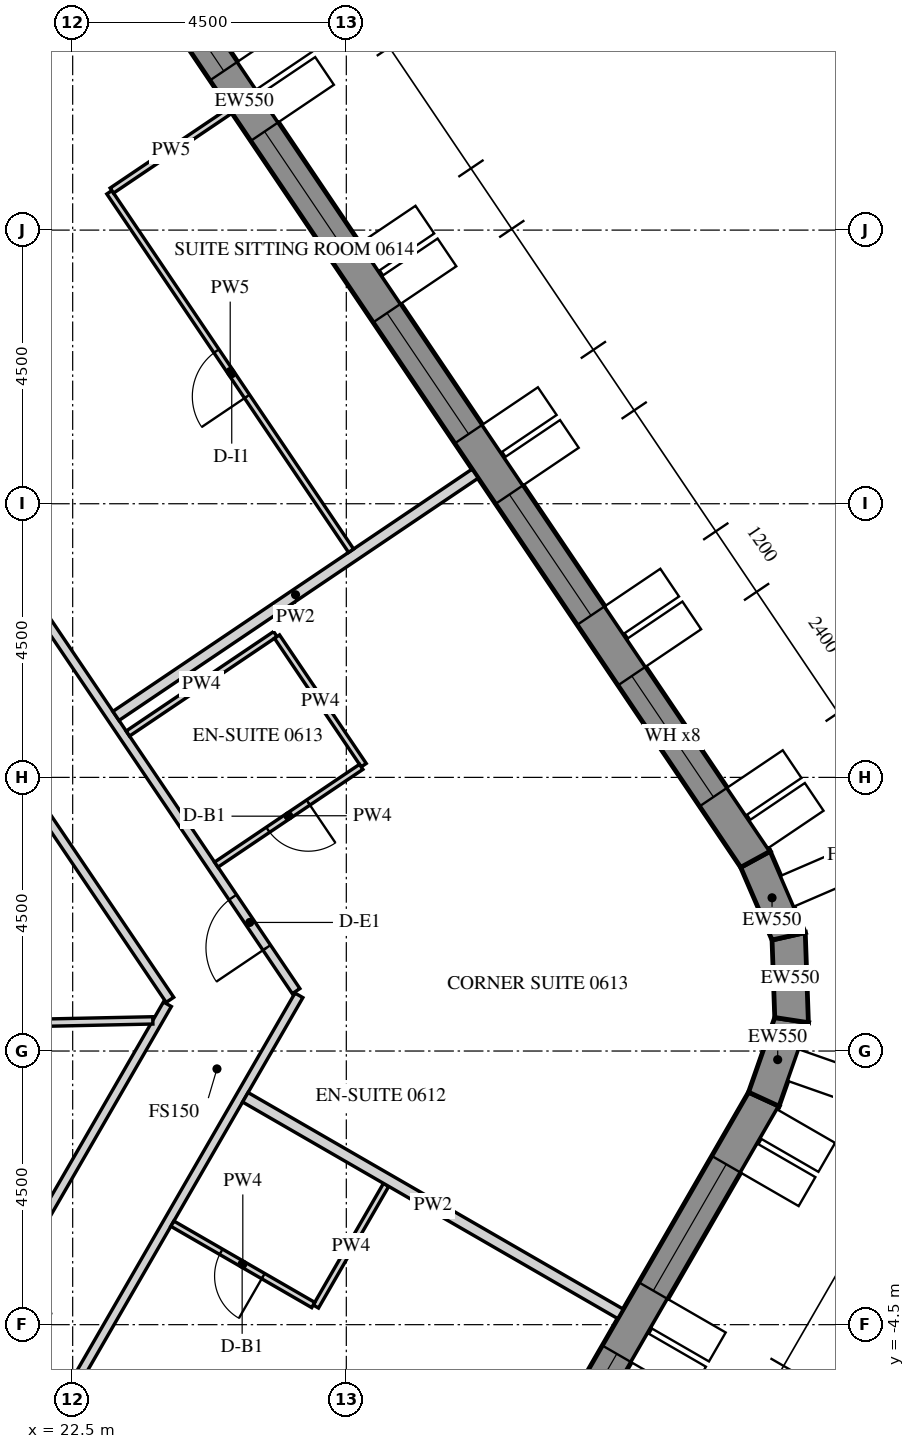
"""IFC4 building model, lengths in metres.
Left out: names, types, materials, properties, quantities, classifications, styles, units other than length and angle.
Written with IfcOpenShell. Run it as: python <this file> out.ifc"""

import sys

from ifc_helpers import new_model, si_unit, direction, frame, frame_2d, origin, place, context, subcontext, project, spatial, polyline, rectangle, outline, extrude, element, fill, save


model = new_model("IFC4")
c1 = context("Model", 3, precision=1e-05, world=origin(), true_north=direction((0.0, 1.0)))
c2 = subcontext(c1, "Body", "Model", "MODEL_VIEW")
j1 = project(units=[si_unit("LENGTHUNIT", "METRE"), si_unit("PLANEANGLEUNIT", "RADIAN")], contexts=[c1])
p1 = place(None, origin())
s1 = spatial("IfcSite", under=j1, at=p1, CompositionType="ELEMENT")
p2 = place(p1, origin())
s2 = spatial("IfcBuilding", under=s1, at=p2, CompositionType="ELEMENT")
p3 = place(p2, frame((0.0, 0.0, 92.1)))
s3 = spatial("IfcBuildingStorey", under=s2, at=p3, CompositionType="ELEMENT", Elevation=92.1)
p4 = place(p3, frame((18.83, -26.835, -0.15), z_axis=(0.0, 0.0, 1.0), x_axis=(0.500003800416, 0.866023209602, 0.0)))
e1 = element("IfcWall", 1, at=p4, inside=s3, PredefinedType="SOLIDWALL", context=c2, shape_type="SweptSolid", body=[
    extrude(outline(polyline([(-0.022, -0.275), (30.097, -0.275), (30.045, 0.275), (0.022, 0.275), (-0.022, -0.275)])), origin(), (0.0, 0.0, 1.0), 3.9),
])
p5 = place(p4, frame((1.236, 0.0, 1.05)))
e2 = element("IfcOpeningElement", 2, at=p5, cuts=e1, PredefinedType="OPENING", context=c2, shape_type="SweptSolid", body=[
    extrude(rectangle(XDim=2.4, YDim=2.4, at=frame_2d((1.2, 1.2))), frame((0.0, 0.285, 0.0), z_axis=(0.0, -1.0, 0.0), x_axis=(1.0, 0.0, 0.0)), (0.0, 0.0, 1.0), 0.57),
])
p6 = place(p4, frame((4.835, 0.0, 1.05)))
e3 = element("IfcOpeningElement", 3, at=p6, cuts=e1, PredefinedType="OPENING", context=c2, shape_type="SweptSolid", body=[
    extrude(rectangle(XDim=2.4, YDim=2.4, at=frame_2d((1.2, 1.2))), frame((0.0, 0.285, 0.0), z_axis=(0.0, -1.0, 0.0), x_axis=(1.0, 0.0, 0.0)), (0.0, 0.0, 1.0), 0.57),
])
p7 = place(p4, frame((8.436, 0.0, 1.05)))
e4 = element("IfcOpeningElement", 4, at=p7, cuts=e1, PredefinedType="OPENING", context=c2, shape_type="SweptSolid", body=[
    extrude(rectangle(XDim=2.4, YDim=2.4, at=frame_2d((1.2, 1.2))), frame((0.0, 0.285, 0.0), z_axis=(0.0, -1.0, 0.0), x_axis=(1.0, 0.0, 0.0)), (0.0, 0.0, 1.0), 0.57),
])
p8 = place(p4, frame((12.035, 0.0, 1.05)))
e5 = element("IfcOpeningElement", 5, at=p8, cuts=e1, PredefinedType="OPENING", context=c2, shape_type="SweptSolid", body=[
    extrude(rectangle(XDim=2.4, YDim=2.4, at=frame_2d((1.2, 1.2))), frame((0.0, 0.285, 0.0), z_axis=(0.0, -1.0, 0.0), x_axis=(1.0, 0.0, 0.0)), (0.0, 0.0, 1.0), 0.57),
])
p9 = place(p4, frame((15.635, 0.0, 1.05)))
e6 = element("IfcOpeningElement", 6, at=p9, cuts=e1, PredefinedType="OPENING", context=c2, shape_type="SweptSolid", body=[
    extrude(rectangle(XDim=2.4, YDim=2.4, at=frame_2d((1.2, 1.2))), frame((0.0, 0.285, 0.0), z_axis=(0.0, -1.0, 0.0), x_axis=(1.0, 0.0, 0.0)), (0.0, 0.0, 1.0), 0.57),
])
p10 = place(p4, frame((19.236, 0.0, 1.05)))
e7 = element("IfcOpeningElement", 7, at=p10, cuts=e1, PredefinedType="OPENING", context=c2, shape_type="SweptSolid", body=[
    extrude(rectangle(XDim=2.4, YDim=2.4, at=frame_2d((1.2, 1.2))), frame((0.0, 0.285, 0.0), z_axis=(0.0, -1.0, 0.0), x_axis=(1.0, 0.0, 0.0)), (0.0, 0.0, 1.0), 0.57),
])
p11 = place(p4, frame((22.835, 0.0, 1.05)))
e8 = element("IfcOpeningElement", 8, at=p11, cuts=e1, PredefinedType="OPENING", context=c2, shape_type="SweptSolid", body=[
    extrude(rectangle(XDim=2.4, YDim=2.4, at=frame_2d((1.2, 1.2))), frame((0.0, 0.285, 0.0), z_axis=(0.0, -1.0, 0.0), x_axis=(1.0, 0.0, 0.0)), (0.0, 0.0, 1.0), 0.57),
])
p12 = place(p4, frame((26.436, 0.0, 1.05)))
e9 = element("IfcOpeningElement", 9, at=p12, cuts=e1, PredefinedType="OPENING", context=c2, shape_type="SweptSolid", body=[
    extrude(rectangle(XDim=2.4, YDim=2.4, at=frame_2d((1.2, 1.2))), frame((0.0, 0.285, 0.0), z_axis=(0.0, -1.0, 0.0), x_axis=(1.0, 0.0, 0.0)), (0.0, 0.0, 1.0), 0.57),
])
p13 = place(p3, frame((33.866, -0.792, -0.15), z_axis=(0.0, 0.0, 1.0), x_axis=(0.33111537203, 0.943590276765, 0.0)))
e10 = element("IfcWall", 10, at=p13, inside=s3, PredefinedType="SOLIDWALL", context=c2, shape_type="SweptSolid", body=[
    extrude(outline(polyline([(-0.026, -0.275), (1.431, -0.275), (1.327, 0.275), (0.026, 0.275), (-0.026, -0.275)])), origin(), (0.0, 0.0, 1.0), 3.9),
])
p14 = place(p3, frame((34.323, 0.509, -0.15), z_axis=(0.0, 0.0, 1.0), x_axis=(-0.034876908462, 0.999391615562, 0.0)))
e11 = element("IfcWall", 11, at=p14, inside=s3, PredefinedType="SOLIDWALL", context=c2, shape_type="SweptSolid", body=[
    extrude(outline(polyline([(-0.052, -0.275), (1.431, -0.275), (1.327, 0.275), (0.052, 0.275), (-0.052, -0.275)])), origin(), (0.0, 0.0, 1.0), 3.9),
])
p15 = place(p3, frame((34.274, 1.887, -0.15), z_axis=(0.0, 0.0, 1.0), x_axis=(-0.396161342798, 0.918180913803, 0.0)))
e12 = element("IfcWall", 12, at=p15, inside=s3, PredefinedType="SOLIDWALL", context=c2, shape_type="SweptSolid", body=[
    extrude(outline(polyline([(-0.052, -0.275), (1.405, -0.275), (1.354, 0.275), (0.052, 0.275), (-0.052, -0.275)])), origin(), (0.0, 0.0, 1.0), 3.9),
])
p16 = place(p3, frame((33.728, 3.153, -0.15), z_axis=(0.0, 0.0, 1.0), x_axis=(-0.559192411416, 0.82903790445, 0.0)))
e13 = element("IfcWall", 13, at=p16, inside=s3, PredefinedType="SOLIDWALL", context=c2, shape_type="SweptSolid", body=[
    extrude(outline(polyline([(-0.026, -0.275), (30.093, -0.275), (30.048, 0.275), (0.026, 0.275), (-0.026, -0.275)])), origin(), (0.0, 0.0, 1.0), 3.9),
])
p17 = place(p16, frame((1.236, 0.0, 1.05)))
e14 = element("IfcOpeningElement", 14, at=p17, cuts=e13, PredefinedType="OPENING", context=c2, shape_type="SweptSolid", body=[
    extrude(rectangle(XDim=2.4, YDim=2.4, at=frame_2d((1.2, 1.2))), frame((0.0, 0.285, 0.0), z_axis=(0.0, -1.0, 0.0), x_axis=(1.0, 0.0, 0.0)), (0.0, 0.0, 1.0), 0.57),
])
p18 = place(p16, frame((4.835, 0.0, 1.05)))
e15 = element("IfcOpeningElement", 15, at=p18, cuts=e13, PredefinedType="OPENING", context=c2, shape_type="SweptSolid", body=[
    extrude(rectangle(XDim=2.4, YDim=2.4, at=frame_2d((1.2, 1.2))), frame((0.0, 0.285, 0.0), z_axis=(0.0, -1.0, 0.0), x_axis=(1.0, 0.0, 0.0)), (0.0, 0.0, 1.0), 0.57),
])
p19 = place(p16, frame((8.436, 0.0, 1.05)))
e16 = element("IfcOpeningElement", 16, at=p19, cuts=e13, PredefinedType="OPENING", context=c2, shape_type="SweptSolid", body=[
    extrude(rectangle(XDim=2.4, YDim=2.4, at=frame_2d((1.2, 1.2))), frame((0.0, 0.285, 0.0), z_axis=(0.0, -1.0, 0.0), x_axis=(1.0, 0.0, 0.0)), (0.0, 0.0, 1.0), 0.57),
])
p20 = place(p16, frame((12.035, 0.0, 1.05)))
e17 = element("IfcOpeningElement", 17, at=p20, cuts=e13, PredefinedType="OPENING", context=c2, shape_type="SweptSolid", body=[
    extrude(rectangle(XDim=2.4, YDim=2.4, at=frame_2d((1.2, 1.2))), frame((0.0, 0.285, 0.0), z_axis=(0.0, -1.0, 0.0), x_axis=(1.0, 0.0, 0.0)), (0.0, 0.0, 1.0), 0.57),
])
p21 = place(p16, frame((15.635, 0.0, 1.05)))
e18 = element("IfcOpeningElement", 18, at=p21, cuts=e13, PredefinedType="OPENING", context=c2, shape_type="SweptSolid", body=[
    extrude(rectangle(XDim=2.4, YDim=2.4, at=frame_2d((1.2, 1.2))), frame((0.0, 0.285, 0.0), z_axis=(0.0, -1.0, 0.0), x_axis=(1.0, 0.0, 0.0)), (0.0, 0.0, 1.0), 0.57),
])
p22 = place(p16, frame((19.236, 0.0, 1.05)))
e19 = element("IfcOpeningElement", 19, at=p22, cuts=e13, PredefinedType="OPENING", context=c2, shape_type="SweptSolid", body=[
    extrude(rectangle(XDim=2.4, YDim=2.4, at=frame_2d((1.2, 1.2))), frame((0.0, 0.285, 0.0), z_axis=(0.0, -1.0, 0.0), x_axis=(1.0, 0.0, 0.0)), (0.0, 0.0, 1.0), 0.57),
])
p23 = place(p16, frame((22.835, 0.0, 1.05)))
e20 = element("IfcOpeningElement", 20, at=p23, cuts=e13, PredefinedType="OPENING", context=c2, shape_type="SweptSolid", body=[
    extrude(rectangle(XDim=2.4, YDim=2.4, at=frame_2d((1.2, 1.2))), frame((0.0, 0.285, 0.0), z_axis=(0.0, -1.0, 0.0), x_axis=(1.0, 0.0, 0.0)), (0.0, 0.0, 1.0), 0.57),
])
p24 = place(p16, frame((26.436, 0.0, 1.05)))
e21 = element("IfcOpeningElement", 21, at=p24, cuts=e13, PredefinedType="OPENING", context=c2, shape_type="SweptSolid", body=[
    extrude(rectangle(XDim=2.4, YDim=2.4, at=frame_2d((1.2, 1.2))), frame((0.0, 0.285, 0.0), z_axis=(0.0, -1.0, 0.0), x_axis=(1.0, 0.0, 0.0)), (0.0, 0.0, 1.0), 0.57),
])
p25 = place(p3, frame((14.102, -20.075, 0.0), z_axis=(0.0, 0.0, 1.0), x_axis=(0.499996816197, 0.866027241946, 0.0)))
e22 = element("IfcWall", 22, at=p25, inside=s3, PredefinedType="PARTITIONING", context=c2, shape_type="SweptSolid", body=[
    extrude(rectangle(XDim=24.238, YDim=0.15, at=frame_2d((12.119, 0.0))), origin(), (0.0, 0.0, 1.0), 2.988),
])
p26 = place(p25, frame((4.729, 0.0, 0.0)))
e23 = element("IfcOpeningElement", 23, at=p26, cuts=e22, PredefinedType="OPENING", context=c2, shape_type="SweptSolid", body=[
    extrude(rectangle(XDim=1.0, YDim=2.1, at=frame_2d((0.5, 1.05))), frame((0.0, 0.085, 0.0), z_axis=(0.0, -1.0, 0.0), x_axis=(1.0, 0.0, 0.0)), (0.0, 0.0, 1.0), 0.17),
])
p27 = place(p25, frame((13.446, 0.0, 0.0)))
e24 = element("IfcOpeningElement", 24, at=p27, cuts=e22, PredefinedType="OPENING", context=c2, shape_type="SweptSolid", body=[
    extrude(rectangle(XDim=1.0, YDim=2.1, at=frame_2d((0.5, 1.05))), frame((0.0, 0.085, 0.0), z_axis=(0.0, -1.0, 0.0), x_axis=(1.0, 0.0, 0.0)), (0.0, 0.0, 1.0), 0.17),
])
p28 = place(p3, frame((26.174, 0.985, 0.0), z_axis=(0.0, 0.0, 1.0), x_axis=(-0.559199676409, 0.82903300411, 0.0)))
e25 = element("IfcWall", 25, at=p28, inside=s3, PredefinedType="PARTITIONING", context=c2, shape_type="SweptSolid", body=[
    extrude(rectangle(XDim=22.335, YDim=0.15, at=frame_2d((11.168, 0.0))), origin(), (0.0, 0.0, 1.0), 2.988),
])
p29 = place(p28, frame((0.863, 0.0, 0.0)))
e26 = element("IfcOpeningElement", 26, at=p29, cuts=e25, PredefinedType="OPENING", context=c2, shape_type="SweptSolid", body=[
    extrude(rectangle(XDim=1.0, YDim=2.1, at=frame_2d((0.5, 1.05))), frame((0.0, 0.085, 0.0), z_axis=(0.0, -1.0, 0.0), x_axis=(1.0, 0.0, 0.0)), (0.0, 0.0, 1.0), 0.17),
])
p30 = place(p28, frame((10.909, 0.0, 0.0)))
e27 = element("IfcOpeningElement", 27, at=p30, cuts=e25, PredefinedType="OPENING", context=c2, shape_type="SweptSolid", body=[
    extrude(rectangle(XDim=1.0, YDim=2.1, at=frame_2d((0.5, 1.05))), frame((0.0, 0.085, 0.0), z_axis=(0.0, -1.0, 0.0), x_axis=(1.0, 0.0, 0.0)), (0.0, 0.0, 1.0), 0.17),
])
p31 = place(p3, frame((24.058, 0.769, 0.0), z_axis=(0.0, 0.0, 1.0), x_axis=(-0.499995346943, -0.866028090212, 0.0)))
e28 = element("IfcWall", 28, at=p31, inside=s3, PredefinedType="PARTITIONING", context=c2, shape_type="SweptSolid", body=[
    extrude(rectangle(XDim=11.616, YDim=0.15, at=frame_2d((5.808, 0.0))), origin(), (0.0, 0.0, 1.0), 2.988),
])
p32 = place(p31, frame((5.358, 0.0, 0.0)))
e29 = element("IfcOpeningElement", 29, at=p32, cuts=e28, PredefinedType="OPENING", context=c2, shape_type="SweptSolid", body=[
    extrude(rectangle(XDim=0.9, YDim=2.1, at=frame_2d((0.45, 1.05))), frame((0.0, 0.085, 0.0), z_axis=(0.0, -1.0, 0.0), x_axis=(1.0, 0.0, 0.0)), (0.0, 0.0, 1.0), 0.17),
])
p33 = place(p3, frame((18.4, 9.291, 0.0), z_axis=(0.0, 0.0, 1.0), x_axis=(0.559191829043, -0.829038297265, 0.0)))
e30 = element("IfcWall", 30, at=p33, inside=s3, PredefinedType="PARTITIONING", context=c2, shape_type="SweptSolid", body=[
    extrude(rectangle(XDim=10.192, YDim=0.15, at=frame_2d((5.096, 0.0))), origin(), (0.0, 0.0, 1.0), 2.988),
])
p34 = place(p33, frame((4.646, 0.0, 0.0)))
e31 = element("IfcOpeningElement", 31, at=p34, cuts=e30, PredefinedType="OPENING", context=c2, shape_type="SweptSolid", body=[
    extrude(rectangle(XDim=0.9, YDim=2.1, at=frame_2d((0.45, 1.05))), frame((0.0, 0.085, 0.0), z_axis=(0.0, -1.0, 0.0), x_axis=(1.0, 0.0, 0.0)), (0.0, 0.0, 1.0), 0.17),
])
p35 = place(p3, frame((27.655, -2.201, 0.0), z_axis=(0.0, 0.0, 1.0), x_axis=(-0.500015210774, -0.866016621662, 0.0)))
e32 = element("IfcWall", 32, at=p35, inside=s3, PredefinedType="PARTITIONING", context=c2, shape_type="SweptSolid", body=[
    extrude(rectangle(XDim=2.31, YDim=0.1, at=frame_2d((1.155, 0.0))), origin(), (0.0, 0.0, 1.0), 2.988),
])
p36 = place(p3, frame((26.456, -4.177, 0.0), z_axis=(0.0, 0.0, 1.0), x_axis=(-0.866021425885, 0.500006889861, 0.0)))
e33 = element("IfcWall", 33, at=p36, inside=s3, PredefinedType="PARTITIONING", context=c2, shape_type="SweptSolid", body=[
    extrude(rectangle(XDim=2.675, YDim=0.1, at=frame_2d((1.337, 0.0))), origin(), (0.0, 0.0, 1.0), 2.988),
])
p37 = place(p36, frame((0.95, 0.0, 0.0)))
e34 = element("IfcOpeningElement", 34, at=p37, cuts=e33, PredefinedType="OPENING", context=c2, shape_type="SweptSolid", body=[
    extrude(rectangle(XDim=0.8, YDim=2.1, at=frame_2d((0.4, 1.05))), frame((0.0, 0.06, 0.0), z_axis=(0.0, -1.0, 0.0), x_axis=(1.0, 0.0, 0.0)), (0.0, 0.0, 1.0), 0.12),
])
p38 = place(p3, frame((31.51, -4.323, 0.0), z_axis=(0.0, 0.0, 1.0), x_axis=(-0.866039509621, 0.499975567179, 0.0)))
e35 = element("IfcWall", 35, at=p38, inside=s3, PredefinedType="PARTITIONING", context=c2, shape_type="SweptSolid", body=[
    extrude(rectangle(XDim=7.125, YDim=0.18, at=frame_2d((3.562, 0.0))), origin(), (0.0, 0.0, 1.0), 2.988),
])
p39 = place(p3, frame((23.407, 5.221, 0.0), z_axis=(0.0, 0.0, 1.0), x_axis=(0.829007334469, 0.559237730663, 0.0)))
e36 = element("IfcWall", 36, at=p39, inside=s3, PredefinedType="PARTITIONING", context=c2, shape_type="SweptSolid", body=[
    extrude(rectangle(XDim=2.925, YDim=0.1, at=frame_2d((1.462, 0.0))), origin(), (0.0, 0.0, 1.0), 2.988),
])
p40 = place(p3, frame((25.86, 6.815, 0.0), z_axis=(0.0, 0.0, 1.0), x_axis=(0.559155442782, -0.829062838878, 0.0)))
e37 = element("IfcWall", 37, at=p40, inside=s3, PredefinedType="PARTITIONING", context=c2, shape_type="SweptSolid", body=[
    extrude(rectangle(XDim=2.55, YDim=0.1, at=frame_2d((1.275, 0.0))), origin(), (0.0, 0.0, 1.0), 2.988),
])
p41 = place(p3, frame((27.245, 4.673, 0.0), z_axis=(0.0, 0.0, 1.0), x_axis=(-0.82904649496, -0.559179675234, 0.0)))
e38 = element("IfcWall", 38, at=p41, inside=s3, PredefinedType="PARTITIONING", context=c2, shape_type="SweptSolid", body=[
    extrude(rectangle(XDim=2.875, YDim=0.1, at=frame_2d((1.438, 0.0))), origin(), (0.0, 0.0, 1.0), 2.988),
])
p42 = place(p41, frame((1.05, 0.0, 0.0)))
e39 = element("IfcOpeningElement", 39, at=p42, cuts=e38, PredefinedType="OPENING", context=c2, shape_type="SweptSolid", body=[
    extrude(rectangle(XDim=0.8, YDim=2.1, at=frame_2d((0.4, 1.05))), frame((0.0, 0.06, 0.0), z_axis=(0.0, -1.0, 0.0), x_axis=(1.0, 0.0, 0.0)), (0.0, 0.0, 1.0), 0.12),
])
p43 = place(p3, frame((29.119, 9.495, 0.0), z_axis=(0.0, 0.0, 1.0), x_axis=(-0.82903334026, -0.559199178055, 0.0)))
e40 = element("IfcWall", 40, at=p43, inside=s3, PredefinedType="PARTITIONING", context=c2, shape_type="SweptSolid", body=[
    extrude(rectangle(XDim=7.125, YDim=0.18, at=frame_2d((3.562, 0.0))), origin(), (0.0, 0.0, 1.0), 2.988),
])
p44 = place(p3, frame((27.079, 8.228, 0.0), z_axis=(0.0, 0.0, 1.0), x_axis=(-0.559200948469, 0.829032146078, 0.0)))
e41 = element("IfcWall", 41, at=p44, inside=s3, PredefinedType="PARTITIONING", context=c2, shape_type="SweptSolid", body=[
    extrude(rectangle(XDim=7.11, YDim=0.1, at=frame_2d((3.555, 0.0))), origin(), (0.0, 0.0, 1.0), 2.988),
])
p45 = place(p44, frame((3.06, 0.0, 0.0)))
e42 = element("IfcOpeningElement", 42, at=p45, cuts=e41, PredefinedType="OPENING", context=c2, shape_type="SweptSolid", body=[
    extrude(rectangle(XDim=0.9, YDim=2.1, at=frame_2d((0.45, 1.05))), frame((0.0, 0.06, 0.0), z_axis=(0.0, -1.0, 0.0), x_axis=(1.0, 0.0, 0.0)), (0.0, 0.0, 1.0), 0.12),
])
p46 = place(p3, frame((23.144, 14.15, 0.0), z_axis=(0.0, 0.0, 1.0), x_axis=(0.829065408555, 0.559151632687, 0.0)))
e43 = element("IfcWall", 43, at=p46, inside=s3, PredefinedType="PARTITIONING", context=c2, shape_type="SweptSolid", body=[
    extrude(rectangle(XDim=2.35, YDim=0.1, at=frame_2d((1.175, 0.0))), origin(), (0.0, 0.0, 1.0), 2.988),
])
p47 = place(p3, frame((23.818, 0.504, 0.0), z_axis=(0.0, 0.0, 1.0), x_axis=(-0.999776284395, -0.021151386765, 0.0)))
e44 = element("IfcWall", 44, at=p47, inside=s3, PredefinedType="PARTITIONING", context=c2, shape_type="SweptSolid", body=[
    extrude(rectangle(XDim=7.849, YDim=0.12, at=frame_2d((3.924, 0.0))), origin(), (0.0, 0.0, 1.0), 2.988),
])
p48 = place(p11, frame((0.0, 0.205, 0.0)))
e45 = element("IfcWindow", 45, at=p48, inside=s3, PartitioningType="DOUBLE_PANEL_VERTICAL", PredefinedType="WINDOW", context=c2, shape_type="SweptSolid", body=[
    extrude(rectangle(XDim=2.4, YDim=2.4, at=frame_2d((1.2, 1.2))), frame((0.0, 0.03, 0.0), z_axis=(0.0, -1.0, 0.0), x_axis=(1.0, 0.0, 0.0)), (0.0, 0.0, 1.0), 0.06),
])
fill(e8, e45)
p49 = place(p12, frame((0.0, 0.205, 0.0)))
e46 = element("IfcWindow", 46, at=p49, inside=s3, PartitioningType="DOUBLE_PANEL_VERTICAL", PredefinedType="WINDOW", context=c2, shape_type="SweptSolid", body=[
    extrude(rectangle(XDim=2.4, YDim=2.4, at=frame_2d((1.2, 1.2))), frame((0.0, 0.03, 0.0), z_axis=(0.0, -1.0, 0.0), x_axis=(1.0, 0.0, 0.0)), (0.0, 0.0, 1.0), 0.06),
])
fill(e9, e46)
p50 = place(p17, frame((0.0, 0.205, 0.0)))
e47 = element("IfcWindow", 47, at=p50, inside=s3, PartitioningType="DOUBLE_PANEL_VERTICAL", PredefinedType="WINDOW", context=c2, shape_type="SweptSolid", body=[
    extrude(rectangle(XDim=2.4, YDim=2.4, at=frame_2d((1.2, 1.2))), frame((0.0, 0.03, 0.0), z_axis=(0.0, -1.0, 0.0), x_axis=(1.0, 0.0, 0.0)), (0.0, 0.0, 1.0), 0.06),
])
fill(e14, e47)
p51 = place(p18, frame((0.0, 0.205, 0.0)))
e48 = element("IfcWindow", 48, at=p51, inside=s3, PartitioningType="DOUBLE_PANEL_VERTICAL", PredefinedType="WINDOW", context=c2, shape_type="SweptSolid", body=[
    extrude(rectangle(XDim=2.4, YDim=2.4, at=frame_2d((1.2, 1.2))), frame((0.0, 0.03, 0.0), z_axis=(0.0, -1.0, 0.0), x_axis=(1.0, 0.0, 0.0)), (0.0, 0.0, 1.0), 0.06),
])
fill(e15, e48)
p52 = place(p19, frame((0.0, 0.205, 0.0)))
e49 = element("IfcWindow", 49, at=p52, inside=s3, PartitioningType="DOUBLE_PANEL_VERTICAL", PredefinedType="WINDOW", context=c2, shape_type="SweptSolid", body=[
    extrude(rectangle(XDim=2.4, YDim=2.4, at=frame_2d((1.2, 1.2))), frame((0.0, 0.03, 0.0), z_axis=(0.0, -1.0, 0.0), x_axis=(1.0, 0.0, 0.0)), (0.0, 0.0, 1.0), 0.06),
])
fill(e16, e49)
p53 = place(p20, frame((0.0, 0.205, 0.0)))
e50 = element("IfcWindow", 50, at=p53, inside=s3, PartitioningType="DOUBLE_PANEL_VERTICAL", PredefinedType="WINDOW", context=c2, shape_type="SweptSolid", body=[
    extrude(rectangle(XDim=2.4, YDim=2.4, at=frame_2d((1.2, 1.2))), frame((0.0, 0.03, 0.0), z_axis=(0.0, -1.0, 0.0), x_axis=(1.0, 0.0, 0.0)), (0.0, 0.0, 1.0), 0.06),
])
fill(e17, e50)
p54 = place(p21, frame((0.0, 0.205, 0.0)))
e51 = element("IfcWindow", 51, at=p54, inside=s3, PartitioningType="DOUBLE_PANEL_VERTICAL", PredefinedType="WINDOW", context=c2, shape_type="SweptSolid", body=[
    extrude(rectangle(XDim=2.4, YDim=2.4, at=frame_2d((1.2, 1.2))), frame((0.0, 0.03, 0.0), z_axis=(0.0, -1.0, 0.0), x_axis=(1.0, 0.0, 0.0)), (0.0, 0.0, 1.0), 0.06),
])
fill(e18, e51)
p55 = place(p37, origin())
e52 = element("IfcDoor", 52, at=p55, inside=s3, OperationType="SINGLE_SWING_RIGHT", PredefinedType="DOOR", context=c2, shape_type="SweptSolid", body=[
    extrude(rectangle(XDim=0.8, YDim=2.1, at=frame_2d((0.4, 1.05))), frame((0.0, 0.025, 0.0), z_axis=(0.0, -1.0, 0.0), x_axis=(1.0, 0.0, 0.0)), (0.0, 0.0, 1.0), 0.05),
])
fill(e34, e52)
p56 = place(p29, origin())
e53 = element("IfcDoor", 53, at=p56, inside=s3, OperationType="SINGLE_SWING_RIGHT", PredefinedType="DOOR", context=c2, shape_type="SweptSolid", body=[
    extrude(rectangle(XDim=1.0, YDim=2.1, at=frame_2d((0.5, 1.05))), frame((0.0, 0.025, 0.0), z_axis=(0.0, -1.0, 0.0), x_axis=(1.0, 0.0, 0.0)), (0.0, 0.0, 1.0), 0.05),
])
fill(e26, e53)
p57 = place(p42, origin())
e54 = element("IfcDoor", 54, at=p57, inside=s3, OperationType="SINGLE_SWING_LEFT", PredefinedType="DOOR", context=c2, shape_type="SweptSolid", body=[
    extrude(rectangle(XDim=0.8, YDim=2.1, at=frame_2d((0.4, 1.05))), frame((0.0, 0.025, 0.0), z_axis=(0.0, -1.0, 0.0), x_axis=(1.0, 0.0, 0.0)), (0.0, 0.0, 1.0), 0.05),
])
fill(e39, e54)
p58 = place(p45, origin())
e55 = element("IfcDoor", 55, at=p58, inside=s3, OperationType="SINGLE_SWING_RIGHT", PredefinedType="DOOR", context=c2, shape_type="SweptSolid", body=[
    extrude(rectangle(XDim=0.9, YDim=2.1, at=frame_2d((0.45, 1.05))), frame((0.0, 0.025, 0.0), z_axis=(0.0, -1.0, 0.0), x_axis=(1.0, 0.0, 0.0)), (0.0, 0.0, 1.0), 0.05),
])
fill(e42, e55)
save(model, sys.argv[1])
